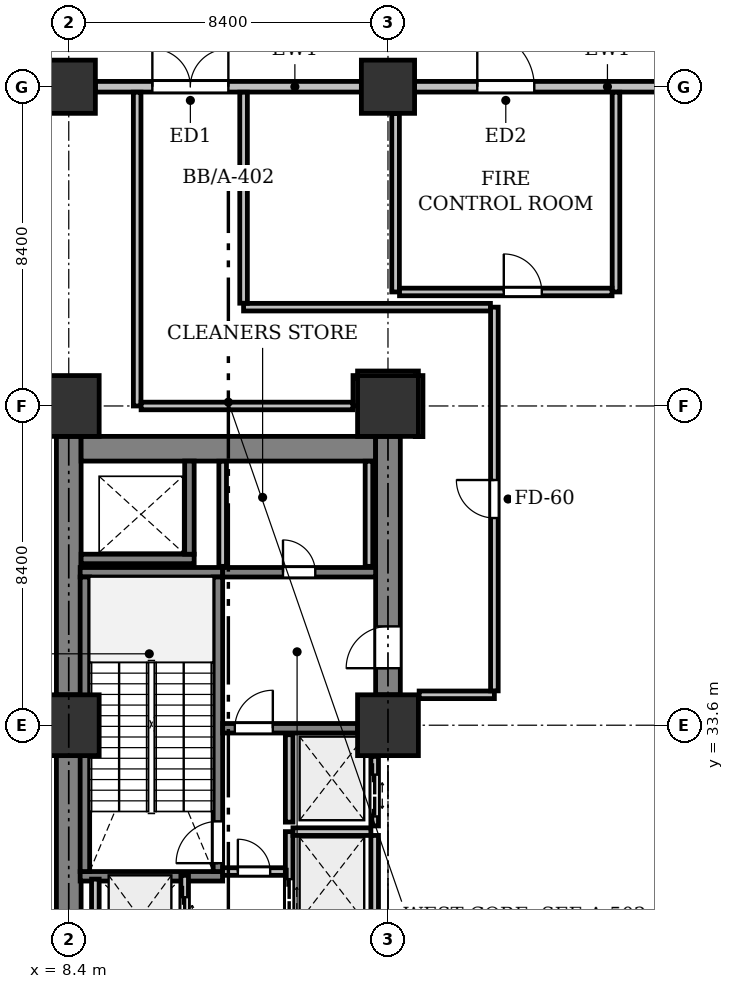
"""IFC4 building model, lengths in metres.
Left out: names, types, materials, properties, quantities, classifications, styles, units other than length and angle.
Written with IfcOpenShell. Run it as: python <this file> out.ifc"""

import sys

from ifc_helpers import new_model, si_unit, direction, frame, frame_2d, origin, origin_2d, place, context, subcontext, project, spatial, rectangle, extrude, element, fill, save


model = new_model("IFC4")
c1 = context("Model", 3, precision=1e-05, world=origin(), true_north=direction((0.0, 1.0)))
c2 = subcontext(c1, "Body", "Model", "MODEL_VIEW")
j1 = project(units=[si_unit("LENGTHUNIT", "METRE"), si_unit("PLANEANGLEUNIT", "RADIAN")], contexts=[c1])
p1 = place(None, origin())
s1 = spatial("IfcSite", under=j1, at=p1, CompositionType="ELEMENT")
p2 = place(p1, origin())
s2 = spatial("IfcBuilding", under=s1, at=p2, CompositionType="ELEMENT")
p3 = place(p2, origin())
s3 = spatial("IfcBuildingStorey", under=s2, at=p3, CompositionType="ELEMENT", Elevation=0.0)
for number, where, z_axis, x_axis in (
    (1, (8.4, 33.6, 0.0), (0.0, 0.0, 1.0), (1.0, 0.0, 0.0)),
    (2, (8.4, 42.0, 0.0), (0.0, 0.0, 1.0), (1.0, 0.0, 0.0)),
):
    element("IfcColumn", number, at=place(p3, frame(where, z_axis=z_axis, x_axis=x_axis)), inside=s3, PredefinedType="COLUMN", context=c2, shape_type="SweptSolid", body=[
        extrude(rectangle(XDim=1.6, YDim=1.6, at=origin_2d()), origin(), (0.0, 0.0, 1.0), 5.4),
    ])
p4 = place(p3, frame((8.4, 50.4, 0.0), z_axis=(0.0, 0.0, 1.0), x_axis=(1.0, 0.0, 0.0)))
e3 = element("IfcColumn", 3, at=p4, inside=s3, PredefinedType="COLUMN", context=c2, shape_type="SweptSolid", body=[
    extrude(rectangle(XDim=1.4, YDim=1.4, at=origin_2d()), origin(), (0.0, 0.0, 1.0), 5.4),
])
for number, where, z_axis, x_axis in (
    (4, (16.8, 33.6, 0.0), (0.0, 0.0, 1.0), (1.0, 0.0, 0.0)),
    (5, (16.8, 42.0, 0.0), (0.0, 0.0, 1.0), (1.0, 0.0, 0.0)),
):
    element("IfcColumn", number, at=place(p3, frame(where, z_axis=z_axis, x_axis=x_axis)), inside=s3, PredefinedType="COLUMN", context=c2, shape_type="SweptSolid", body=[
        extrude(rectangle(XDim=1.6, YDim=1.6, at=origin_2d()), origin(), (0.0, 0.0, 1.0), 5.4),
    ])
p5 = place(p3, frame((16.8, 50.4, 0.0), z_axis=(0.0, 0.0, 1.0), x_axis=(1.0, 0.0, 0.0)))
e6 = element("IfcColumn", 6, at=p5, inside=s3, PredefinedType="COLUMN", context=c2, shape_type="SweptSolid", body=[
    extrude(rectangle(XDim=1.4, YDim=1.4, at=origin_2d()), origin(), (0.0, 0.0, 1.0), 5.4),
])
p6 = place(p3, frame((9.1, 50.4, 0.0), z_axis=(0.0, 0.0, 1.0), x_axis=(1.0, 0.0, 0.0)))
e7 = element("IfcWall", 7, at=p6, inside=s3, PredefinedType="STANDARD", context=c2, shape_type="SweptSolid", body=[
    extrude(rectangle(XDim=7.0, YDim=0.28, at=frame_2d((3.5, 0.0))), origin(), (0.0, 0.0, 1.0), 4.325),
])
p7 = place(p6, frame((1.5, 0.0, 0.0)))
e8 = element("IfcOpeningElement", 8, at=p7, cuts=e7, PredefinedType="OPENING", context=c2, shape_type="SweptSolid", body=[
    extrude(rectangle(XDim=2.0, YDim=2.4, at=frame_2d((1.0, 1.2))), frame((0.0, 0.15, 0.0), z_axis=(0.0, -1.0, 0.0), x_axis=(1.0, 0.0, 0.0)), (0.0, 0.0, 1.0), 0.3),
])
p8 = place(p3, frame((17.5, 50.4, 0.0), z_axis=(0.0, 0.0, 1.0), x_axis=(1.0, 0.0, 0.0)))
e9 = element("IfcWall", 9, at=p8, inside=s3, PredefinedType="STANDARD", context=c2, shape_type="SweptSolid", body=[
    extrude(rectangle(XDim=7.0, YDim=0.28, at=frame_2d((3.5, 0.0))), origin(), (0.0, 0.0, 1.0), 4.325),
])
p9 = place(p8, frame((1.65, 0.0, 0.0)))
e10 = element("IfcOpeningElement", 10, at=p9, cuts=e9, PredefinedType="OPENING", context=c2, shape_type="SweptSolid", body=[
    extrude(rectangle(XDim=1.5, YDim=2.25, at=frame_2d((0.75, 1.125))), frame((0.0, 0.15, 0.0), z_axis=(0.0, -1.0, 0.0), x_axis=(1.0, 0.0, 0.0)), (0.0, 0.0, 1.0), 0.3),
])
for number, where, z_axis, x_axis in (
    (11, (8.4, 26.0, 0.0), (0.0, 0.0, 1.0), (0.0, 1.0, 0.0)),
    (12, (8.4, 34.4, 0.0), (0.0, 0.0, 1.0), (0.0, 1.0, 0.0)),
):
    element("IfcWall", number, at=place(p3, frame(where, z_axis=z_axis, x_axis=x_axis)), inside=s3, PredefinedType="SHEAR", context=c2, shape_type="SweptSolid", body=[
        extrude(rectangle(XDim=6.8, YDim=0.65, at=frame_2d((3.4, 0.0))), origin(), (0.0, 0.0, 1.0), 5.125),
    ])
p10 = place(p3, frame((8.725, 40.875, 0.0), z_axis=(0.0, 0.0, 1.0), x_axis=(1.0, 0.0, 0.0)))
e13 = element("IfcWall", 13, at=p10, inside=s3, PredefinedType="SHEAR", context=c2, shape_type="SweptSolid", body=[
    extrude(rectangle(XDim=7.75, YDim=0.65, at=frame_2d((3.875, 0.0))), origin(), (0.0, 0.0, 1.0), 5.125),
])
p11 = place(p3, frame((16.8, 34.4, 0.0), z_axis=(0.0, 0.0, 1.0), x_axis=(0.0, 1.0, 0.0)))
e14 = element("IfcWall", 14, at=p11, inside=s3, PredefinedType="SHEAR", context=c2, shape_type="SweptSolid", body=[
    extrude(rectangle(XDim=6.8, YDim=0.65, at=frame_2d((3.4, 0.0))), origin(), (0.0, 0.0, 1.0), 5.125),
])
p12 = place(p11, frame((0.7, 0.0, 0.0)))
e15 = element("IfcOpeningElement", 15, at=p12, cuts=e14, PredefinedType="OPENING", context=c2, shape_type="SweptSolid", body=[
    extrude(rectangle(XDim=1.1, YDim=2.15, at=frame_2d((0.55, 1.075))), frame((0.0, 0.335, 0.0), z_axis=(0.0, -1.0, 0.0), x_axis=(1.0, 0.0, 0.0)), (0.0, 0.0, 1.0), 0.67),
])
for number, where, z_axis, x_axis in (
    (16, (12.45, 29.625, 0.0), (0.0, 0.0, 1.0), (-1.0, 0.0, 0.0)),
    (17, (12.45, 37.625, 0.0), (0.0, 0.0, 1.0), (-1.0, 0.0, 0.0)),
):
    element("IfcWall", number, at=place(p3, frame(where, z_axis=z_axis, x_axis=x_axis)), inside=s3, PredefinedType="SHEAR", context=c2, shape_type="SweptSolid", body=[
        extrude(rectangle(XDim=3.75, YDim=0.25, at=frame_2d((1.875, 0.0))), origin(), (0.0, 0.0, 1.0), 5.125),
    ])
p13 = place(p3, frame((12.325, 29.75, 0.0), z_axis=(0.0, 0.0, 1.0), x_axis=(0.0, 1.0, 0.0)))
e18 = element("IfcWall", 18, at=p13, inside=s3, PredefinedType="SHEAR", context=c2, shape_type="SweptSolid", body=[
    extrude(rectangle(XDim=7.75, YDim=0.25, at=frame_2d((3.875, 0.0))), origin(), (0.0, 0.0, 1.0), 5.125),
])
p14 = place(p13, frame((0.22, 0.0, 0.0)))
e19 = element("IfcOpeningElement", 19, at=p14, cuts=e18, PredefinedType="OPENING", context=c2, shape_type="SweptSolid", body=[
    extrude(rectangle(XDim=1.1, YDim=2.15, at=frame_2d((0.55, 1.075))), frame((0.0, 0.135, 0.0), z_axis=(0.0, -1.0, 0.0), x_axis=(1.0, 0.0, 0.0)), (0.0, 0.0, 1.0), 0.27),
])
p15 = place(p3, frame((8.825, 29.75, 0.0), z_axis=(0.0, 0.0, 1.0), x_axis=(0.0, 1.0, 0.0)))
e20 = element("IfcWall", 20, at=p15, inside=s3, PredefinedType="SHEAR", context=c2, shape_type="SweptSolid", body=[
    extrude(rectangle(XDim=7.75, YDim=0.25, at=frame_2d((3.875, 0.0))), origin(), (0.0, 0.0, 1.0), 5.125),
])
p16 = place(p3, frame((8.725, 37.975, 0.0), z_axis=(0.0, 0.0, 1.0), x_axis=(1.0, 0.0, 0.0)))
e21 = element("IfcWall", 21, at=p16, inside=s3, PredefinedType="SHEAR", context=c2, shape_type="SweptSolid", body=[
    extrude(rectangle(XDim=2.975, YDim=0.25, at=frame_2d((1.487, 0.0))), origin(), (0.0, 0.0, 1.0), 5.125),
])
p17 = place(p3, frame((11.575, 38.1, 0.0), z_axis=(0.0, 0.0, 1.0), x_axis=(0.0, 1.0, 0.0)))
e22 = element("IfcWall", 22, at=p17, inside=s3, PredefinedType="SHEAR", context=c2, shape_type="SweptSolid", body=[
    extrude(rectangle(XDim=2.45, YDim=0.25, at=frame_2d((1.225, 0.0))), origin(), (0.0, 0.0, 1.0), 5.125),
])
p18 = place(p3, frame((12.45, 33.52, 0.0), z_axis=(0.0, 0.0, 1.0), x_axis=(1.0, 0.0, 0.0)))
e23 = element("IfcWall", 23, at=p18, inside=s3, PredefinedType="SHEAR", context=c2, shape_type="SweptSolid", body=[
    extrude(rectangle(XDim=3.55, YDim=0.25, at=frame_2d((1.775, 0.0))), origin(), (0.0, 0.0, 1.0), 5.125),
])
p19 = place(p18, frame((0.32, 0.0, 0.0)))
e24 = element("IfcOpeningElement", 24, at=p19, cuts=e23, PredefinedType="OPENING", context=c2, shape_type="SweptSolid", body=[
    extrude(rectangle(XDim=1.0, YDim=2.15, at=frame_2d((0.5, 1.075))), frame((0.0, 0.135, 0.0), z_axis=(0.0, -1.0, 0.0), x_axis=(1.0, 0.0, 0.0)), (0.0, 0.0, 1.0), 0.27),
])
p20 = place(p3, frame((12.45, 29.75, 0.0), z_axis=(0.0, 0.0, 1.0), x_axis=(1.0, 0.0, 0.0)))
e25 = element("IfcWall", 25, at=p20, inside=s3, PredefinedType="PARTITIONING", context=c2, shape_type="SweptSolid", body=[
    extrude(rectangle(XDim=1.65, YDim=0.2, at=frame_2d((0.825, 0.0))), origin(), (0.0, 0.0, 1.0), 5.125),
])
p21 = place(p20, frame((0.4, 0.0, 0.0)))
e26 = element("IfcOpeningElement", 26, at=p21, cuts=e25, PredefinedType="OPENING", context=c2, shape_type="SweptSolid", body=[
    extrude(rectangle(XDim=0.85, YDim=2.15, at=frame_2d((0.425, 1.075))), frame((0.0, 0.11, 0.0), z_axis=(0.0, -1.0, 0.0), x_axis=(1.0, 0.0, 0.0)), (0.0, 0.0, 1.0), 0.22),
])
p22 = place(p3, frame((12.45, 37.625, 0.0), z_axis=(0.0, 0.0, 1.0), x_axis=(1.0, 0.0, 0.0)))
e27 = element("IfcWall", 27, at=p22, inside=s3, PredefinedType="SHEAR", context=c2, shape_type="SweptSolid", body=[
    extrude(rectangle(XDim=4.025, YDim=0.25, at=frame_2d((2.013, 0.0))), origin(), (0.0, 0.0, 1.0), 5.125),
])
p23 = place(p22, frame((1.587, 0.0, 0.0)))
e28 = element("IfcOpeningElement", 28, at=p23, cuts=e27, PredefinedType="OPENING", context=c2, shape_type="SweptSolid", body=[
    extrude(rectangle(XDim=0.85, YDim=2.15, at=frame_2d((0.425, 1.075))), frame((0.0, 0.135, 0.0), z_axis=(0.0, -1.0, 0.0), x_axis=(1.0, 0.0, 0.0)), (0.0, 0.0, 1.0), 0.27),
])
p24 = place(p3, frame((11.45, 27.4, 0.0), z_axis=(0.0, 0.0, 1.0), x_axis=(0.0, 1.0, 0.0)))
e29 = element("IfcWall", 29, at=p24, inside=s3, PredefinedType="PARTITIONING", context=c2, shape_type="SweptSolid", body=[
    extrude(rectangle(XDim=2.25, YDim=0.2, at=frame_2d((1.125, 0.0))), origin(), (0.0, 0.0, 1.0), 5.125),
])
p25 = place(p24, frame((0.575, 0.0, 0.0)))
e30 = element("IfcOpeningElement", 30, at=p25, cuts=e29, PredefinedType="OPENING", context=c2, shape_type="SweptSolid", body=[
    extrude(rectangle(XDim=1.1, YDim=2.2, at=frame_2d((0.55, 1.1))), frame((0.0, 0.11, 0.0), z_axis=(0.0, -1.0, 0.0), x_axis=(1.0, 0.0, 0.0)), (0.0, 0.0, 1.0), 0.22),
])
p26 = place(p3, frame((9.1, 27.5, 0.0), z_axis=(0.0, 0.0, 1.0), x_axis=(0.0, 1.0, 0.0)))
e31 = element("IfcWall", 31, at=p26, inside=s3, PredefinedType="PARTITIONING", context=c2, shape_type="SweptSolid", body=[
    extrude(rectangle(XDim=2.05, YDim=0.2, at=frame_2d((1.025, 0.0))), origin(), (0.0, 0.0, 1.0), 5.125),
])
p27 = place(p3, frame((14.2, 28.3, 0.0), z_axis=(0.0, 0.0, 1.0), x_axis=(0.0, 1.0, 0.0)))
e32 = element("IfcWall", 32, at=p27, inside=s3, PredefinedType="PARTITIONING", context=c2, shape_type="SweptSolid", body=[
    extrude(rectangle(XDim=2.5, YDim=0.2, at=frame_2d((1.25, 0.0))), origin(), (0.0, 0.0, 1.0), 5.125),
])
p28 = place(p27, frame((0.15, 0.0, 0.0)))
e33 = element("IfcOpeningElement", 33, at=p28, cuts=e32, PredefinedType="OPENING", context=c2, shape_type="SweptSolid", body=[
    extrude(rectangle(XDim=1.1, YDim=2.2, at=frame_2d((0.55, 1.1))), frame((0.0, 0.11, 0.0), z_axis=(0.0, -1.0, 0.0), x_axis=(1.0, 0.0, 0.0)), (0.0, 0.0, 1.0), 0.22),
])
p29 = place(p3, frame((16.45, 28.4, 0.0), z_axis=(0.0, 0.0, 1.0), x_axis=(0.0, 1.0, 0.0)))
e34 = element("IfcWall", 34, at=p29, inside=s3, PredefinedType="PARTITIONING", context=c2, shape_type="SweptSolid", body=[
    extrude(rectangle(XDim=2.3, YDim=0.2, at=frame_2d((1.15, 0.0))), origin(), (0.0, 0.0, 1.0), 5.125),
])
p30 = place(p3, frame((14.3, 30.8, 0.0), z_axis=(0.0, 0.0, 1.0), x_axis=(1.0, 0.0, 0.0)))
e35 = element("IfcWall", 35, at=p30, inside=s3, PredefinedType="PARTITIONING", context=c2, shape_type="SweptSolid", body=[
    extrude(rectangle(XDim=2.05, YDim=0.2, at=frame_2d((1.025, 0.0))), origin(), (0.0, 0.0, 1.0), 5.125),
])
p31 = place(p3, frame((16.45, 30.95, 0.0), z_axis=(0.0, 0.0, 1.0), x_axis=(0.0, 1.0, 0.0)))
e36 = element("IfcWall", 36, at=p31, inside=s3, PredefinedType="PARTITIONING", context=c2, shape_type="SweptSolid", body=[
    extrude(rectangle(XDim=1.83, YDim=0.2, at=frame_2d((0.915, 0.0))), origin(), (0.0, 0.0, 1.0), 5.125),
])
p32 = place(p31, frame((0.25, 0.0, 0.0)))
e37 = element("IfcOpeningElement", 37, at=p32, cuts=e36, PredefinedType="OPENING", context=c2, shape_type="SweptSolid", body=[
    extrude(rectangle(XDim=1.1, YDim=2.2, at=frame_2d((0.55, 1.1))), frame((0.0, 0.11, 0.0), z_axis=(0.0, -1.0, 0.0), x_axis=(1.0, 0.0, 0.0)), (0.0, 0.0, 1.0), 0.22),
])
p33 = place(p3, frame((14.2, 31.05, 0.0), z_axis=(0.0, 0.0, 1.0), x_axis=(0.0, 1.0, 0.0)))
e38 = element("IfcWall", 38, at=p33, inside=s3, PredefinedType="PARTITIONING", context=c2, shape_type="SweptSolid", body=[
    extrude(rectangle(XDim=2.3, YDim=0.2, at=frame_2d((1.15, 0.0))), origin(), (0.0, 0.0, 1.0), 5.125),
])
p34 = place(p3, frame((15.98, 42.0, 0.0), z_axis=(0.0, 0.0, 1.0), x_axis=(0.0, 1.0, 0.0)))
e39 = element("IfcWall", 39, at=p34, inside=s3, PredefinedType="PARTITIONING", context=c2, shape_type="SweptSolid", body=[
    extrude(rectangle(XDim=0.8, YDim=0.2, at=frame_2d((0.4, 0.0))), origin(), (0.0, 0.0, 1.0), 4.325),
])
p35 = place(p3, frame((16.0, 42.82, 0.0), z_axis=(0.0, 0.0, 1.0), x_axis=(1.0, 0.0, 0.0)))
e40 = element("IfcWall", 40, at=p35, inside=s3, PredefinedType="PARTITIONING", context=c2, shape_type="SweptSolid", body=[
    extrude(rectangle(XDim=1.6, YDim=0.2, at=frame_2d((0.8, 0.0))), origin(), (0.0, 0.0, 1.0), 4.513),
])
p36 = place(p3, frame((17.62, 42.8, 0.0), z_axis=(0.0, 0.0, 1.0), x_axis=(-0.000608087452, -0.999999815115, 0.0)))
e41 = element("IfcWall", 41, at=p36, inside=s3, PredefinedType="PARTITIONING", context=c2, shape_type="SweptSolid", body=[
    extrude(rectangle(XDim=1.606, YDim=0.2, at=frame_2d((0.803, 0.0))), origin(), (0.0, 0.0, 1.0), 4.325),
])
p37 = place(p3, frame((17.62, 34.4, 0.0), z_axis=(0.0, 0.0, 1.0), x_axis=(1.0, 0.0, 0.0)))
e42 = element("IfcWall", 42, at=p37, inside=s3, PredefinedType="PARTITIONING", context=c2, shape_type="SweptSolid", body=[
    extrude(rectangle(XDim=1.98, YDim=0.2, at=frame_2d((0.99, 0.0))), origin(), (0.0, 0.0, 1.0), 5.125),
])
p38 = place(p3, frame((19.6, 34.504, 0.0), z_axis=(0.0, 0.0, 1.0), x_axis=(0.0, 1.0, 0.0)))
e43 = element("IfcWall", 43, at=p38, inside=s3, PredefinedType="PARTITIONING", context=c2, shape_type="SweptSolid", body=[
    extrude(rectangle(XDim=10.096, YDim=0.2, at=frame_2d((5.048, 0.0))), origin(), (0.0, 0.0, 1.0), 4.325),
])
p39 = place(p38, frame((4.548, 0.0, 0.0)))
e44 = element("IfcOpeningElement", 44, at=p39, cuts=e43, PredefinedType="OPENING", context=c2, shape_type="SweptSolid", body=[
    extrude(rectangle(XDim=1.0, YDim=2.15, at=frame_2d((0.5, 1.075))), frame((0.0, 0.11, 0.0), z_axis=(0.0, -1.0, 0.0), x_axis=(1.0, 0.0, 0.0)), (0.0, 0.0, 1.0), 0.22),
])
p40 = place(p3, frame((19.496, 44.6, 0.0), z_axis=(0.0, 0.0, 1.0), x_axis=(-1.0, 0.0, 0.0)))
e45 = element("IfcWall", 45, at=p40, inside=s3, PredefinedType="PARTITIONING", context=c2, shape_type="SweptSolid", body=[
    extrude(rectangle(XDim=6.496, YDim=0.2, at=frame_2d((3.248, 0.0))), origin(), (0.0, 0.0, 1.0), 4.513),
])
p41 = place(p3, frame((13.0, 44.704, 0.0), z_axis=(0.0, 0.0, 1.0), x_axis=(0.0, 1.0, 0.0)))
e46 = element("IfcWall", 46, at=p41, inside=s3, PredefinedType="PARTITIONING", context=c2, shape_type="SweptSolid", body=[
    extrude(rectangle(XDim=5.552, YDim=0.2, at=frame_2d((2.776, 0.0))), origin(), (0.0, 0.0, 1.0), 5.125),
])
p42 = place(p3, frame((10.2, 50.256, 0.0), z_axis=(0.0, 0.0, 1.0), x_axis=(0.0, -1.0, 0.0)))
e47 = element("IfcWall", 47, at=p42, inside=s3, PredefinedType="PARTITIONING", context=c2, shape_type="SweptSolid", body=[
    extrude(rectangle(XDim=8.256, YDim=0.2, at=frame_2d((4.128, 0.0))), origin(), (0.0, 0.0, 1.0), 4.325),
])
p43 = place(p3, frame((10.304, 42.0, 0.0), z_axis=(0.0, 0.0, 1.0), x_axis=(1.0, 0.0, 0.0)))
e48 = element("IfcWall", 48, at=p43, inside=s3, PredefinedType="PARTITIONING", context=c2, shape_type="SweptSolid", body=[
    extrude(rectangle(XDim=5.572, YDim=0.2, at=frame_2d((2.786, 0.0))), origin(), (0.0, 0.0, 1.0), 4.325),
])
for number, where, z_axis, x_axis in (
    (49, (16.3, 37.78, 0.0), (0.0, 0.0, 1.0), (0.0, 1.0, 0.0)),
    (50, (12.45, 40.546, 0.0), (0.0, 0.0, 1.0), (0.0, -1.0, 0.0)),
):
    element("IfcWall", number, at=place(p3, frame(where, z_axis=z_axis, x_axis=x_axis)), inside=s3, PredefinedType="PARTITIONING", context=c2, shape_type="SweptSolid", body=[
        extrude(rectangle(XDim=2.766, YDim=0.2, at=frame_2d((1.383, 0.0))), origin(), (0.0, 0.0, 1.0), 4.025),
    ])
p44 = place(p3, frame((22.8, 45.0, 0.0), z_axis=(0.0, 0.0, 1.0), x_axis=(0.0, 1.0, 0.0)))
e51 = element("IfcWall", 51, at=p44, inside=s3, PredefinedType="PARTITIONING", context=c2, shape_type="SweptSolid", body=[
    extrude(rectangle(XDim=5.256, YDim=0.2, at=frame_2d((2.628, 0.0))), origin(), (0.0, 0.0, 1.0), 5.125),
])
p45 = place(p3, frame((17.0, 49.695, 0.0), z_axis=(0.0, 0.0, 1.0), x_axis=(0.0, -1.0, 0.0)))
e52 = element("IfcWall", 52, at=p45, inside=s3, PredefinedType="PARTITIONING", context=c2, shape_type="SweptSolid", body=[
    extrude(rectangle(XDim=4.695, YDim=0.2, at=frame_2d((2.348, 0.0))), origin(), (0.0, 0.0, 1.0), 4.513),
])
p46 = place(p3, frame((17.104, 45.0, 0.0), z_axis=(0.0, 0.0, 1.0), x_axis=(1.0, 0.0, 0.0)))
e53 = element("IfcWall", 53, at=p46, inside=s3, PredefinedType="PARTITIONING", context=c2, shape_type="SweptSolid", body=[
    extrude(rectangle(XDim=5.592, YDim=0.2, at=frame_2d((2.796, 0.0))), origin(), (0.0, 0.0, 1.0), 4.722),
])
p47 = place(p46, frame((2.743, 0.0, 0.0)))
e54 = element("IfcOpeningElement", 54, at=p47, cuts=e53, PredefinedType="OPENING", context=c2, shape_type="SweptSolid", body=[
    extrude(rectangle(XDim=1.0, YDim=2.15, at=frame_2d((0.5, 1.075))), frame((0.0, 0.11, 0.0), z_axis=(0.0, -1.0, 0.0), x_axis=(1.0, 0.0, 0.0)), (0.0, 0.0, 1.0), 0.22),
])
p48 = place(p7, origin())
e55 = element("IfcDoor", 55, at=p48, inside=s3, OperationType="DOUBLE_DOOR_SINGLE_SWING", PredefinedType="DOOR", context=c2, shape_type="SweptSolid", body=[
    extrude(rectangle(XDim=2.0, YDim=2.4, at=frame_2d((1.0, 1.2))), frame((0.0, 0.025, 0.0), z_axis=(0.0, -1.0, 0.0), x_axis=(1.0, 0.0, 0.0)), (0.0, 0.0, 1.0), 0.05),
])
fill(e8, e55)
p49 = place(p9, origin())
e56 = element("IfcDoor", 56, at=p49, inside=s3, OperationType="SINGLE_SWING_LEFT", PredefinedType="DOOR", context=c2, shape_type="SweptSolid", body=[
    extrude(rectangle(XDim=1.5, YDim=2.25, at=frame_2d((0.75, 1.125))), frame((0.0, 0.025, 0.0), z_axis=(0.0, -1.0, 0.0), x_axis=(1.0, 0.0, 0.0)), (0.0, 0.0, 1.0), 0.05),
])
fill(e10, e56)
p50 = place(p12, origin())
e57 = element("IfcDoor", 57, at=p50, inside=s3, OperationType="SINGLE_SWING_LEFT", PredefinedType="DOOR", context=c2, shape_type="SweptSolid", body=[
    extrude(rectangle(XDim=1.1, YDim=2.15, at=frame_2d((0.55, 1.075))), frame((0.0, 0.025, 0.0), z_axis=(0.0, -1.0, 0.0), x_axis=(1.0, 0.0, 0.0)), (0.0, 0.0, 1.0), 0.05),
])
fill(e15, e57)
p51 = place(p14, origin())
e58 = element("IfcDoor", 58, at=p51, inside=s3, OperationType="SINGLE_SWING_LEFT", PredefinedType="DOOR", context=c2, shape_type="SweptSolid", body=[
    extrude(rectangle(XDim=1.1, YDim=2.15, at=frame_2d((0.55, 1.075))), frame((0.0, 0.025, 0.0), z_axis=(0.0, -1.0, 0.0), x_axis=(1.0, 0.0, 0.0)), (0.0, 0.0, 1.0), 0.05),
])
fill(e19, e58)
p52 = place(p19, origin())
e59 = element("IfcDoor", 59, at=p52, inside=s3, OperationType="SINGLE_SWING_RIGHT", PredefinedType="DOOR", context=c2, shape_type="SweptSolid", body=[
    extrude(rectangle(XDim=1.0, YDim=2.15, at=frame_2d((0.5, 1.075))), frame((0.0, 0.025, 0.0), z_axis=(0.0, -1.0, 0.0), x_axis=(1.0, 0.0, 0.0)), (0.0, 0.0, 1.0), 0.05),
])
fill(e24, e59)
p53 = place(p21, origin())
e60 = element("IfcDoor", 60, at=p53, inside=s3, OperationType="SINGLE_SWING_LEFT", PredefinedType="DOOR", context=c2, shape_type="SweptSolid", body=[
    extrude(rectangle(XDim=0.85, YDim=2.15, at=frame_2d((0.425, 1.075))), frame((0.0, 0.025, 0.0), z_axis=(0.0, -1.0, 0.0), x_axis=(1.0, 0.0, 0.0)), (0.0, 0.0, 1.0), 0.05),
])
fill(e26, e60)
p54 = place(p25, origin())
e61 = element("IfcDoor", 61, at=p54, inside=s3, OperationType="DOUBLE_DOOR_SLIDING", PredefinedType="DOOR", context=c2, shape_type="SweptSolid", body=[
    extrude(rectangle(XDim=1.1, YDim=2.2, at=frame_2d((0.55, 1.1))), frame((0.0, 0.025, 0.0), z_axis=(0.0, -1.0, 0.0), x_axis=(1.0, 0.0, 0.0)), (0.0, 0.0, 1.0), 0.05),
])
fill(e30, e61)
p55 = place(p28, origin())
e62 = element("IfcDoor", 62, at=p55, inside=s3, OperationType="DOUBLE_DOOR_SLIDING", PredefinedType="DOOR", context=c2, shape_type="SweptSolid", body=[
    extrude(rectangle(XDim=1.1, YDim=2.2, at=frame_2d((0.55, 1.1))), frame((0.0, 0.025, 0.0), z_axis=(0.0, -1.0, 0.0), x_axis=(1.0, 0.0, 0.0)), (0.0, 0.0, 1.0), 0.05),
])
fill(e33, e62)
p56 = place(p32, origin())
e63 = element("IfcDoor", 63, at=p56, inside=s3, OperationType="DOUBLE_DOOR_SLIDING", PredefinedType="DOOR", context=c2, shape_type="SweptSolid", body=[
    extrude(rectangle(XDim=1.1, YDim=2.2, at=frame_2d((0.55, 1.1))), frame((0.0, 0.025, 0.0), z_axis=(0.0, -1.0, 0.0), x_axis=(1.0, 0.0, 0.0)), (0.0, 0.0, 1.0), 0.05),
])
fill(e37, e63)
p57 = place(p39, origin())
e64 = element("IfcDoor", 64, at=p57, inside=s3, OperationType="SINGLE_SWING_RIGHT", PredefinedType="DOOR", context=c2, shape_type="SweptSolid", body=[
    extrude(rectangle(XDim=1.0, YDim=2.15, at=frame_2d((0.5, 1.075))), frame((0.0, 0.025, 0.0), z_axis=(0.0, -1.0, 0.0), x_axis=(1.0, 0.0, 0.0)), (0.0, 0.0, 1.0), 0.05),
])
fill(e44, e64)
p58 = place(p23, origin())
e65 = element("IfcDoor", 65, at=p58, inside=s3, OperationType="SINGLE_SWING_LEFT", PredefinedType="DOOR", context=c2, shape_type="SweptSolid", body=[
    extrude(rectangle(XDim=0.85, YDim=2.15, at=frame_2d((0.425, 1.075))), frame((0.0, 0.025, 0.0), z_axis=(0.0, -1.0, 0.0), x_axis=(1.0, 0.0, 0.0)), (0.0, 0.0, 1.0), 0.05),
])
fill(e28, e65)
p59 = place(p47, origin())
e66 = element("IfcDoor", 66, at=p59, inside=s3, OperationType="SINGLE_SWING_LEFT", PredefinedType="DOOR", context=c2, shape_type="SweptSolid", body=[
    extrude(rectangle(XDim=1.0, YDim=2.15, at=frame_2d((0.5, 1.075))), frame((0.0, 0.025, 0.0), z_axis=(0.0, -1.0, 0.0), x_axis=(1.0, 0.0, 0.0)), (0.0, 0.0, 1.0), 0.05),
])
fill(e54, e66)
save(model, sys.argv[1])
